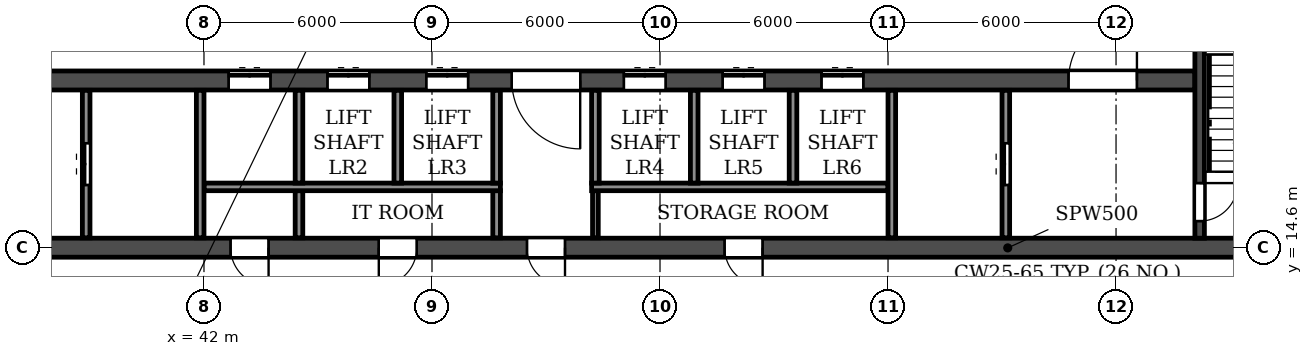
"""IFC4 building model, lengths in metres.
Left out: names, types, materials, properties, quantities, classifications, styles, units other than length and angle.
Written with IfcOpenShell. Run it as: python <this file> out.ifc"""

import sys

from ifc_helpers import new_model, si_unit, direction, frame, frame_2d, origin, place, context, subcontext, project, spatial, rectangle, extrude, element, fill, save


model = new_model("IFC4")
c1 = context("Model", 3, precision=1e-05, world=origin(), true_north=direction((0.0, 1.0)))
c2 = subcontext(c1, "Body", "Model", "MODEL_VIEW")
j1 = project(units=[si_unit("LENGTHUNIT", "METRE"), si_unit("PLANEANGLEUNIT", "RADIAN")], contexts=[c1])
p1 = place(None, origin())
s1 = spatial("IfcSite", under=j1, at=p1, CompositionType="ELEMENT")
p2 = place(p1, origin())
s2 = spatial("IfcBuilding", under=s1, at=p2, CompositionType="ELEMENT")
p3 = place(p2, frame((0.0, 0.0, 92.7)))
s3 = spatial("IfcBuildingStorey", under=s2, at=p3, CompositionType="ELEMENT", Elevation=92.7)
p4 = place(p3, frame((8.6, 14.6, 0.0), z_axis=(0.0, 0.0, 1.0), x_axis=(1.0, 0.0, 0.0)))
e1 = element("IfcWall", 1, at=p4, inside=s3, PredefinedType="SOLIDWALL", context=c2, shape_type="SweptSolid", body=[
    extrude(rectangle(XDim=84.8, YDim=0.5, at=frame_2d((42.4, 0.0))), origin(), (0.0, 0.0, 1.0), 3.06),
])
p5 = place(p4, frame((4.2, 0.0, 0.0)))
e2 = element("IfcOpeningElement", 2, at=p5, cuts=e1, PredefinedType="OPENING", context=c2, shape_type="SweptSolid", body=[
    extrude(rectangle(XDim=1.0, YDim=2.1, at=frame_2d((0.5, 1.05))), frame((0.0, 0.26, 0.0), z_axis=(0.0, -1.0, 0.0), x_axis=(1.0, 0.0, 0.0)), (0.0, 0.0, 1.0), 0.52),
])
p6 = place(p4, frame((10.3, 0.0, 0.0)))
e3 = element("IfcOpeningElement", 3, at=p6, cuts=e1, PredefinedType="OPENING", context=c2, shape_type="SweptSolid", body=[
    extrude(rectangle(XDim=1.0, YDim=2.1, at=frame_2d((0.5, 1.05))), frame((0.0, 0.26, 0.0), z_axis=(0.0, -1.0, 0.0), x_axis=(1.0, 0.0, 0.0)), (0.0, 0.0, 1.0), 0.52),
])
p7 = place(p4, frame((18.2, 0.0, 0.0)))
e4 = element("IfcOpeningElement", 4, at=p7, cuts=e1, PredefinedType="OPENING", context=c2, shape_type="SweptSolid", body=[
    extrude(rectangle(XDim=1.0, YDim=2.1, at=frame_2d((0.5, 1.05))), frame((0.0, 0.26, 0.0), z_axis=(0.0, -1.0, 0.0), x_axis=(1.0, 0.0, 0.0)), (0.0, 0.0, 1.0), 0.52),
])
p8 = place(p4, frame((22.8, 0.0, 0.0)))
e5 = element("IfcOpeningElement", 5, at=p8, cuts=e1, PredefinedType="OPENING", context=c2, shape_type="SweptSolid", body=[
    extrude(rectangle(XDim=1.0, YDim=2.1, at=frame_2d((0.5, 1.05))), frame((0.0, 0.26, 0.0), z_axis=(0.0, -1.0, 0.0), x_axis=(1.0, 0.0, 0.0)), (0.0, 0.0, 1.0), 0.52),
])
p9 = place(p4, frame((34.1, 0.0, 0.0)))
e6 = element("IfcOpeningElement", 6, at=p9, cuts=e1, PredefinedType="OPENING", context=c2, shape_type="SweptSolid", body=[
    extrude(rectangle(XDim=1.0, YDim=2.1, at=frame_2d((0.5, 1.05))), frame((0.0, 0.26, 0.0), z_axis=(0.0, -1.0, 0.0), x_axis=(1.0, 0.0, 0.0)), (0.0, 0.0, 1.0), 0.52),
])
p10 = place(p4, frame((38.0, 0.0, 0.0)))
e7 = element("IfcOpeningElement", 7, at=p10, cuts=e1, PredefinedType="OPENING", context=c2, shape_type="SweptSolid", body=[
    extrude(rectangle(XDim=1.0, YDim=2.1, at=frame_2d((0.5, 1.05))), frame((0.0, 0.26, 0.0), z_axis=(0.0, -1.0, 0.0), x_axis=(1.0, 0.0, 0.0)), (0.0, 0.0, 1.0), 0.52),
])
p11 = place(p4, frame((41.9, 0.0, 0.0)))
e8 = element("IfcOpeningElement", 8, at=p11, cuts=e1, PredefinedType="OPENING", context=c2, shape_type="SweptSolid", body=[
    extrude(rectangle(XDim=1.0, YDim=2.1, at=frame_2d((0.5, 1.05))), frame((0.0, 0.26, 0.0), z_axis=(0.0, -1.0, 0.0), x_axis=(1.0, 0.0, 0.0)), (0.0, 0.0, 1.0), 0.52),
])
p12 = place(p4, frame((47.1, 0.0, 0.0)))
e9 = element("IfcOpeningElement", 9, at=p12, cuts=e1, PredefinedType="OPENING", context=c2, shape_type="SweptSolid", body=[
    extrude(rectangle(XDim=1.0, YDim=2.1, at=frame_2d((0.5, 1.05))), frame((0.0, 0.26, 0.0), z_axis=(0.0, -1.0, 0.0), x_axis=(1.0, 0.0, 0.0)), (0.0, 0.0, 1.0), 0.52),
])
p13 = place(p4, frame((61.0, 0.0, 0.0)))
e10 = element("IfcOpeningElement", 10, at=p13, cuts=e1, PredefinedType="OPENING", context=c2, shape_type="SweptSolid", body=[
    extrude(rectangle(XDim=1.0, YDim=2.1, at=frame_2d((0.5, 1.05))), frame((0.0, 0.26, 0.0), z_axis=(0.0, -1.0, 0.0), x_axis=(1.0, 0.0, 0.0)), (0.0, 0.0, 1.0), 0.52),
])
p14 = place(p4, frame((65.6, 0.0, 0.0)))
e11 = element("IfcOpeningElement", 11, at=p14, cuts=e1, PredefinedType="OPENING", context=c2, shape_type="SweptSolid", body=[
    extrude(rectangle(XDim=1.0, YDim=2.1, at=frame_2d((0.5, 1.05))), frame((0.0, 0.26, 0.0), z_axis=(0.0, -1.0, 0.0), x_axis=(1.0, 0.0, 0.0)), (0.0, 0.0, 1.0), 0.52),
])
p15 = place(p4, frame((73.5, 0.0, 0.0)))
e12 = element("IfcOpeningElement", 12, at=p15, cuts=e1, PredefinedType="OPENING", context=c2, shape_type="SweptSolid", body=[
    extrude(rectangle(XDim=1.0, YDim=2.1, at=frame_2d((0.5, 1.05))), frame((0.0, 0.26, 0.0), z_axis=(0.0, -1.0, 0.0), x_axis=(1.0, 0.0, 0.0)), (0.0, 0.0, 1.0), 0.52),
])
p16 = place(p4, frame((76.25, 0.0, 0.0)))
e13 = element("IfcOpeningElement", 13, at=p16, cuts=e1, PredefinedType="OPENING", context=c2, shape_type="SweptSolid", body=[
    extrude(rectangle(XDim=1.0, YDim=2.1, at=frame_2d((0.5, 1.05))), frame((0.0, 0.26, 0.0), z_axis=(0.0, -1.0, 0.0), x_axis=(1.0, 0.0, 0.0)), (0.0, 0.0, 1.0), 0.52),
])
p17 = place(p4, frame((80.95, 0.0, 0.0)))
e14 = element("IfcOpeningElement", 14, at=p17, cuts=e1, PredefinedType="OPENING", context=c2, shape_type="SweptSolid", body=[
    extrude(rectangle(XDim=1.0, YDim=2.1, at=frame_2d((0.5, 1.05))), frame((0.0, 0.26, 0.0), z_axis=(0.0, -1.0, 0.0), x_axis=(1.0, 0.0, 0.0)), (0.0, 0.0, 1.0), 0.52),
])
p18 = place(p3, frame((33.925, 19.0, 0.0), z_axis=(0.0, 0.0, 1.0), x_axis=(1.0, 0.0, 0.0)))
e15 = element("IfcWall", 15, at=p18, inside=s3, PredefinedType="SOLIDWALL", context=c2, shape_type="SweptSolid", body=[
    extrude(rectangle(XDim=34.15, YDim=0.5, at=frame_2d((17.075, 0.0))), origin(), (0.0, 0.0, 1.0), 3.06),
])
p19 = place(p18, frame((16.175, 0.0, 0.0)))
e16 = element("IfcOpeningElement", 16, at=p19, cuts=e15, PredefinedType="OPENING", context=c2, shape_type="SweptSolid", body=[
    extrude(rectangle(XDim=1.8, YDim=2.1, at=frame_2d((0.9, 1.05))), frame((0.0, 0.26, 0.0), z_axis=(0.0, -1.0, 0.0), x_axis=(1.0, 0.0, 0.0)), (0.0, 0.0, 1.0), 0.52),
])
p20 = place(p18, frame((1.525, 0.0, 0.0)))
e17 = element("IfcOpeningElement", 17, at=p20, cuts=e15, PredefinedType="OPENING", context=c2, shape_type="SweptSolid", body=[
    extrude(rectangle(XDim=1.8, YDim=2.1, at=frame_2d((0.9, 1.05))), frame((0.0, 0.26, 0.0), z_axis=(0.0, -1.0, 0.0), x_axis=(1.0, 0.0, 0.0)), (0.0, 0.0, 1.0), 0.52),
])
p21 = place(p18, frame((8.725, 0.0, 0.0)))
e18 = element("IfcOpeningElement", 18, at=p21, cuts=e15, PredefinedType="OPENING", context=c2, shape_type="SweptSolid", body=[
    extrude(rectangle(XDim=1.1, YDim=2.1, at=frame_2d((0.55, 1.05))), frame((0.0, 0.26, 0.0), z_axis=(0.0, -1.0, 0.0), x_axis=(1.0, 0.0, 0.0)), (0.0, 0.0, 1.0), 0.52),
])
p22 = place(p18, frame((11.325, 0.0, 0.0)))
e19 = element("IfcOpeningElement", 19, at=p22, cuts=e15, PredefinedType="OPENING", context=c2, shape_type="SweptSolid", body=[
    extrude(rectangle(XDim=1.1, YDim=2.1, at=frame_2d((0.55, 1.05))), frame((0.0, 0.26, 0.0), z_axis=(0.0, -1.0, 0.0), x_axis=(1.0, 0.0, 0.0)), (0.0, 0.0, 1.0), 0.52),
])
p23 = place(p18, frame((13.925, 0.0, 0.0)))
e20 = element("IfcOpeningElement", 20, at=p23, cuts=e15, PredefinedType="OPENING", context=c2, shape_type="SweptSolid", body=[
    extrude(rectangle(XDim=1.1, YDim=2.1, at=frame_2d((0.55, 1.05))), frame((0.0, 0.26, 0.0), z_axis=(0.0, -1.0, 0.0), x_axis=(1.0, 0.0, 0.0)), (0.0, 0.0, 1.0), 0.52),
])
p24 = place(p18, frame((19.125, 0.0, 0.0)))
e21 = element("IfcOpeningElement", 21, at=p24, cuts=e15, PredefinedType="OPENING", context=c2, shape_type="SweptSolid", body=[
    extrude(rectangle(XDim=1.1, YDim=2.1, at=frame_2d((0.55, 1.05))), frame((0.0, 0.26, 0.0), z_axis=(0.0, -1.0, 0.0), x_axis=(1.0, 0.0, 0.0)), (0.0, 0.0, 1.0), 0.52),
])
p25 = place(p18, frame((21.725, 0.0, 0.0)))
e22 = element("IfcOpeningElement", 22, at=p25, cuts=e15, PredefinedType="OPENING", context=c2, shape_type="SweptSolid", body=[
    extrude(rectangle(XDim=1.1, YDim=2.1, at=frame_2d((0.55, 1.05))), frame((0.0, 0.26, 0.0), z_axis=(0.0, -1.0, 0.0), x_axis=(1.0, 0.0, 0.0)), (0.0, 0.0, 1.0), 0.52),
])
p26 = place(p18, frame((24.325, 0.0, 0.0)))
e23 = element("IfcOpeningElement", 23, at=p26, cuts=e15, PredefinedType="OPENING", context=c2, shape_type="SweptSolid", body=[
    extrude(rectangle(XDim=1.1, YDim=2.1, at=frame_2d((0.55, 1.05))), frame((0.0, 0.26, 0.0), z_axis=(0.0, -1.0, 0.0), x_axis=(1.0, 0.0, 0.0)), (0.0, 0.0, 1.0), 0.52),
])
p27 = place(p18, frame((30.825, 0.0, 0.0)))
e24 = element("IfcOpeningElement", 24, at=p27, cuts=e15, PredefinedType="OPENING", context=c2, shape_type="SweptSolid", body=[
    extrude(rectangle(XDim=1.8, YDim=2.1, at=frame_2d((0.9, 1.05))), frame((0.0, 0.26, 0.0), z_axis=(0.0, -1.0, 0.0), x_axis=(1.0, 0.0, 0.0)), (0.0, 0.0, 1.0), 0.52),
])
p28 = place(p3, frame((68.2, 14.85, 0.0), z_axis=(0.0, 0.0, 1.0), x_axis=(0.0, 1.0, 0.0)))
e25 = element("IfcWall", 25, at=p28, inside=s3, PredefinedType="SOLIDWALL", context=c2, shape_type="SweptSolid", body=[
    extrude(rectangle(XDim=7.625, YDim=0.25, at=frame_2d((3.812, 0.0))), origin(), (0.0, 0.0, 1.0), 3.06),
])
p29 = place(p28, frame((0.45, 0.0, 0.0)))
e26 = element("IfcOpeningElement", 26, at=p29, cuts=e25, PredefinedType="OPENING", context=c2, shape_type="SweptSolid", body=[
    extrude(rectangle(XDim=1.0, YDim=2.1, at=frame_2d((0.5, 1.05))), frame((0.0, 0.135, 0.0), z_axis=(0.0, -1.0, 0.0), x_axis=(1.0, 0.0, 0.0)), (0.0, 0.0, 1.0), 0.27),
])
p30 = place(p3, frame((52.3, 14.86, 0.0), z_axis=(0.0, 0.0, 1.0), x_axis=(0.0, 1.0, 0.0)))
e27 = element("IfcWall", 27, at=p30, inside=s3, PredefinedType="PARTITIONING", context=c2, shape_type="SweptSolid", body=[
    extrude(rectangle(XDim=1.24, YDim=0.15, at=frame_2d((0.62, 0.0))), origin(), (0.0, 0.0, 1.0), 3.06),
])
for number, where, z_axis, x_axis in (
    (28, (44.5, 14.86, 0.0), (0.0, 0.0, 1.0), (0.0, 1.0, 0.0)),
    (29, (49.7, 14.86, 0.0), (0.0, 0.0, 1.0), (0.0, 1.0, 0.0)),
):
    element("IfcWall", number, at=place(p3, frame(where, z_axis=z_axis, x_axis=x_axis)), inside=s3, PredefinedType="PARTITIONING", context=c2, shape_type="SweptSolid", body=[
        extrude(rectangle(XDim=1.24, YDim=0.2, at=frame_2d((0.62, 0.0))), origin(), (0.0, 0.0, 1.0), 3.06),
    ])
for number, where, z_axis, x_axis in (
    (30, (42.0, 16.2, 0.0), (0.0, 0.0, 1.0), (1.0, 0.0, 0.0)),
    (31, (52.2, 16.2, 0.0), (0.0, 0.0, 1.0), (1.0, 0.0, 0.0)),
):
    element("IfcWall", number, at=place(p3, frame(where, z_axis=z_axis, x_axis=x_axis)), inside=s3, PredefinedType="PARTITIONING", context=c2, shape_type="SweptSolid", body=[
        extrude(rectangle(XDim=7.8, YDim=0.2, at=frame_2d((3.9, 0.0))), origin(), (0.0, 0.0, 1.0), 3.06),
    ])
p31 = place(p3, frame((38.9, 14.86, 0.0), z_axis=(0.0, 0.0, 1.0), x_axis=(0.0, 1.0, 0.0)))
e32 = element("IfcWall", 32, at=p31, inside=s3, PredefinedType="PARTITIONING", context=c2, shape_type="SweptSolid", body=[
    extrude(rectangle(XDim=3.88, YDim=0.2, at=frame_2d((1.94, 0.0))), origin(), (0.0, 0.0, 1.0), 3.06),
])
p32 = place(p31, frame((1.39, 0.0, 0.0)))
e33 = element("IfcOpeningElement", 33, at=p32, cuts=e32, PredefinedType="OPENING", context=c2, shape_type="SweptSolid", body=[
    extrude(rectangle(XDim=1.1, YDim=2.1, at=frame_2d((0.55, 1.05))), frame((0.0, 0.11, 0.0), z_axis=(0.0, -1.0, 0.0), x_axis=(1.0, 0.0, 0.0)), (0.0, 0.0, 1.0), 0.22),
])
p33 = place(p3, frame((41.9, 14.86, 0.0), z_axis=(0.0, 0.0, 1.0), x_axis=(0.0, 1.0, 0.0)))
e34 = element("IfcWall", 34, at=p33, inside=s3, PredefinedType="PARTITIONING", context=c2, shape_type="SweptSolid", body=[
    extrude(rectangle(XDim=3.88, YDim=0.2, at=frame_2d((1.94, 0.0))), origin(), (0.0, 0.0, 1.0), 3.06),
])
for number, where, z_axis, x_axis in (
    (35, (44.5, 16.3, 0.0), (0.0, 0.0, 1.0), (0.0, 1.0, 0.0)),
    (36, (47.1, 16.3, 0.0), (0.0, 0.0, 1.0), (0.0, 1.0, 0.0)),
    (37, (49.7, 16.3, 0.0), (0.0, 0.0, 1.0), (0.0, 1.0, 0.0)),
    (38, (52.3, 16.3, 0.0), (0.0, 0.0, 1.0), (0.0, 1.0, 0.0)),
    (39, (54.9, 16.3, 0.0), (0.0, 0.0, 1.0), (0.0, 1.0, 0.0)),
    (40, (57.5, 16.3, 0.0), (0.0, 0.0, 1.0), (0.0, 1.0, 0.0)),
):
    element("IfcWall", number, at=place(p3, frame(where, z_axis=z_axis, x_axis=x_axis)), inside=s3, PredefinedType="PARTITIONING", context=c2, shape_type="SweptSolid", body=[
        extrude(rectangle(XDim=2.44, YDim=0.2, at=frame_2d((1.22, 0.0))), origin(), (0.0, 0.0, 1.0), 3.06),
    ])
p34 = place(p3, frame((60.1, 14.86, 0.0), z_axis=(0.0, 0.0, 1.0), x_axis=(0.0, 1.0, 0.0)))
e41 = element("IfcWall", 41, at=p34, inside=s3, PredefinedType="PARTITIONING", context=c2, shape_type="SweptSolid", body=[
    extrude(rectangle(XDim=3.88, YDim=0.2, at=frame_2d((1.94, 0.0))), origin(), (0.0, 0.0, 1.0), 3.06),
])
p35 = place(p3, frame((63.1, 14.86, 0.0), z_axis=(0.0, 0.0, 1.0), x_axis=(0.0, 1.0, 0.0)))
e42 = element("IfcWall", 42, at=p35, inside=s3, PredefinedType="PARTITIONING", context=c2, shape_type="SweptSolid", body=[
    extrude(rectangle(XDim=3.88, YDim=0.2, at=frame_2d((1.94, 0.0))), origin(), (0.0, 0.0, 1.0), 3.06),
])
p36 = place(p35, frame((1.39, 0.0, 0.0)))
e43 = element("IfcOpeningElement", 43, at=p36, cuts=e42, PredefinedType="OPENING", context=c2, shape_type="SweptSolid", body=[
    extrude(rectangle(XDim=1.1, YDim=2.1, at=frame_2d((0.55, 1.05))), frame((0.0, 0.11, 0.0), z_axis=(0.0, -1.0, 0.0), x_axis=(1.0, 0.0, 0.0)), (0.0, 0.0, 1.0), 0.22),
])
p37 = place(p9, frame((1.0, 0.0, 0.0), z_axis=(0.0, 0.0, 1.0), x_axis=(-1.0, 0.0, 0.0)))
e44 = element("IfcDoor", 44, at=p37, inside=s3, OperationType="SINGLE_SWING_LEFT", PredefinedType="DOOR", context=c2, shape_type="SweptSolid", body=[
    extrude(rectangle(XDim=1.0, YDim=2.1, at=frame_2d((0.5, 1.05))), frame((0.0, 0.025, 0.0), z_axis=(0.0, -1.0, 0.0), x_axis=(1.0, 0.0, 0.0)), (0.0, 0.0, 1.0), 0.05),
])
fill(e6, e44)
p38 = place(p10, frame((1.0, 0.0, 0.0), z_axis=(0.0, 0.0, 1.0), x_axis=(-1.0, 0.0, 0.0)))
e45 = element("IfcDoor", 45, at=p38, inside=s3, OperationType="SINGLE_SWING_RIGHT", PredefinedType="DOOR", context=c2, shape_type="SweptSolid", body=[
    extrude(rectangle(XDim=1.0, YDim=2.1, at=frame_2d((0.5, 1.05))), frame((0.0, 0.025, 0.0), z_axis=(0.0, -1.0, 0.0), x_axis=(1.0, 0.0, 0.0)), (0.0, 0.0, 1.0), 0.05),
])
fill(e7, e45)
p39 = place(p11, frame((1.0, 0.0, 0.0), z_axis=(0.0, 0.0, 1.0), x_axis=(-1.0, 0.0, 0.0)))
e46 = element("IfcDoor", 46, at=p39, inside=s3, OperationType="SINGLE_SWING_LEFT", PredefinedType="DOOR", context=c2, shape_type="SweptSolid", body=[
    extrude(rectangle(XDim=1.0, YDim=2.1, at=frame_2d((0.5, 1.05))), frame((0.0, 0.025, 0.0), z_axis=(0.0, -1.0, 0.0), x_axis=(1.0, 0.0, 0.0)), (0.0, 0.0, 1.0), 0.05),
])
fill(e8, e46)
p40 = place(p12, frame((1.0, 0.0, 0.0), z_axis=(0.0, 0.0, 1.0), x_axis=(-1.0, 0.0, 0.0)))
e47 = element("IfcDoor", 47, at=p40, inside=s3, OperationType="SINGLE_SWING_LEFT", PredefinedType="DOOR", context=c2, shape_type="SweptSolid", body=[
    extrude(rectangle(XDim=1.0, YDim=2.1, at=frame_2d((0.5, 1.05))), frame((0.0, 0.025, 0.0), z_axis=(0.0, -1.0, 0.0), x_axis=(1.0, 0.0, 0.0)), (0.0, 0.0, 1.0), 0.05),
])
fill(e9, e47)
p41 = place(p36, origin())
e48 = element("IfcDoor", 48, at=p41, inside=s3, OperationType="DOUBLE_DOOR_SLIDING", PredefinedType="DOOR", context=c2, shape_type="SweptSolid", body=[
    extrude(rectangle(XDim=1.1, YDim=2.1, at=frame_2d((0.55, 1.05))), frame((0.0, 0.025, 0.0), z_axis=(0.0, -1.0, 0.0), x_axis=(1.0, 0.0, 0.0)), (0.0, 0.0, 1.0), 0.05),
])
fill(e43, e48)
p42 = place(p29, frame((1.0, 0.0, 0.0), z_axis=(0.0, 0.0, 1.0), x_axis=(-1.0, 0.0, 0.0)))
e49 = element("IfcDoor", 49, at=p42, inside=s3, OperationType="SINGLE_SWING_LEFT", PredefinedType="DOOR", context=c2, shape_type="SweptSolid", body=[
    extrude(rectangle(XDim=1.0, YDim=2.1, at=frame_2d((0.5, 1.05))), frame((0.0, 0.025, 0.0), z_axis=(0.0, -1.0, 0.0), x_axis=(1.0, 0.0, 0.0)), (0.0, 0.0, 1.0), 0.05),
])
fill(e26, e49)
p43 = place(p32, origin())
e50 = element("IfcDoor", 50, at=p43, inside=s3, OperationType="DOUBLE_DOOR_SLIDING", PredefinedType="DOOR", context=c2, shape_type="SweptSolid", body=[
    extrude(rectangle(XDim=1.1, YDim=2.1, at=frame_2d((0.55, 1.05))), frame((0.0, 0.025, 0.0), z_axis=(0.0, -1.0, 0.0), x_axis=(1.0, 0.0, 0.0)), (0.0, 0.0, 1.0), 0.05),
])
fill(e33, e50)
p44 = place(p19, frame((1.8, 0.0, 0.0), z_axis=(0.0, 0.0, 1.0), x_axis=(-1.0, 0.0, 0.0)))
e51 = element("IfcDoor", 51, at=p44, inside=s3, OperationType="DOUBLE_DOOR_SINGLE_SWING", PredefinedType="DOOR", context=c2, shape_type="SweptSolid", body=[
    extrude(rectangle(XDim=1.8, YDim=2.1, at=frame_2d((0.9, 1.05))), frame((0.0, 0.025, 0.0), z_axis=(0.0, -1.0, 0.0), x_axis=(1.0, 0.0, 0.0)), (0.0, 0.0, 1.0), 0.05),
])
fill(e16, e51)
p45 = place(p21, origin())
e52 = element("IfcDoor", 52, at=p45, inside=s3, OperationType="DOUBLE_DOOR_SLIDING", PredefinedType="DOOR", context=c2, shape_type="SweptSolid", body=[
    extrude(rectangle(XDim=1.1, YDim=2.1, at=frame_2d((0.55, 1.05))), frame((0.0, 0.025, 0.0), z_axis=(0.0, -1.0, 0.0), x_axis=(1.0, 0.0, 0.0)), (0.0, 0.0, 1.0), 0.05),
])
fill(e18, e52)
p46 = place(p22, origin())
e53 = element("IfcDoor", 53, at=p46, inside=s3, OperationType="DOUBLE_DOOR_SLIDING", PredefinedType="DOOR", context=c2, shape_type="SweptSolid", body=[
    extrude(rectangle(XDim=1.1, YDim=2.1, at=frame_2d((0.55, 1.05))), frame((0.0, 0.025, 0.0), z_axis=(0.0, -1.0, 0.0), x_axis=(1.0, 0.0, 0.0)), (0.0, 0.0, 1.0), 0.05),
])
fill(e19, e53)
p47 = place(p23, origin())
e54 = element("IfcDoor", 54, at=p47, inside=s3, OperationType="DOUBLE_DOOR_SLIDING", PredefinedType="DOOR", context=c2, shape_type="SweptSolid", body=[
    extrude(rectangle(XDim=1.1, YDim=2.1, at=frame_2d((0.55, 1.05))), frame((0.0, 0.025, 0.0), z_axis=(0.0, -1.0, 0.0), x_axis=(1.0, 0.0, 0.0)), (0.0, 0.0, 1.0), 0.05),
])
fill(e20, e54)
p48 = place(p24, origin())
e55 = element("IfcDoor", 55, at=p48, inside=s3, OperationType="DOUBLE_DOOR_SLIDING", PredefinedType="DOOR", context=c2, shape_type="SweptSolid", body=[
    extrude(rectangle(XDim=1.1, YDim=2.1, at=frame_2d((0.55, 1.05))), frame((0.0, 0.025, 0.0), z_axis=(0.0, -1.0, 0.0), x_axis=(1.0, 0.0, 0.0)), (0.0, 0.0, 1.0), 0.05),
])
fill(e21, e55)
p49 = place(p25, origin())
e56 = element("IfcDoor", 56, at=p49, inside=s3, OperationType="DOUBLE_DOOR_SLIDING", PredefinedType="DOOR", context=c2, shape_type="SweptSolid", body=[
    extrude(rectangle(XDim=1.1, YDim=2.1, at=frame_2d((0.55, 1.05))), frame((0.0, 0.025, 0.0), z_axis=(0.0, -1.0, 0.0), x_axis=(1.0, 0.0, 0.0)), (0.0, 0.0, 1.0), 0.05),
])
fill(e22, e56)
p50 = place(p26, origin())
e57 = element("IfcDoor", 57, at=p50, inside=s3, OperationType="DOUBLE_DOOR_SLIDING", PredefinedType="DOOR", context=c2, shape_type="SweptSolid", body=[
    extrude(rectangle(XDim=1.1, YDim=2.1, at=frame_2d((0.55, 1.05))), frame((0.0, 0.025, 0.0), z_axis=(0.0, -1.0, 0.0), x_axis=(1.0, 0.0, 0.0)), (0.0, 0.0, 1.0), 0.05),
])
fill(e23, e57)
p51 = place(p27, origin())
e58 = element("IfcDoor", 58, at=p51, inside=s3, OperationType="DOUBLE_DOOR_SINGLE_SWING", PredefinedType="DOOR", context=c2, shape_type="SweptSolid", body=[
    extrude(rectangle(XDim=1.8, YDim=2.1, at=frame_2d((0.9, 1.05))), frame((0.0, 0.025, 0.0), z_axis=(0.0, -1.0, 0.0), x_axis=(1.0, 0.0, 0.0)), (0.0, 0.0, 1.0), 0.05),
])
fill(e24, e58)
save(model, sys.argv[1])
